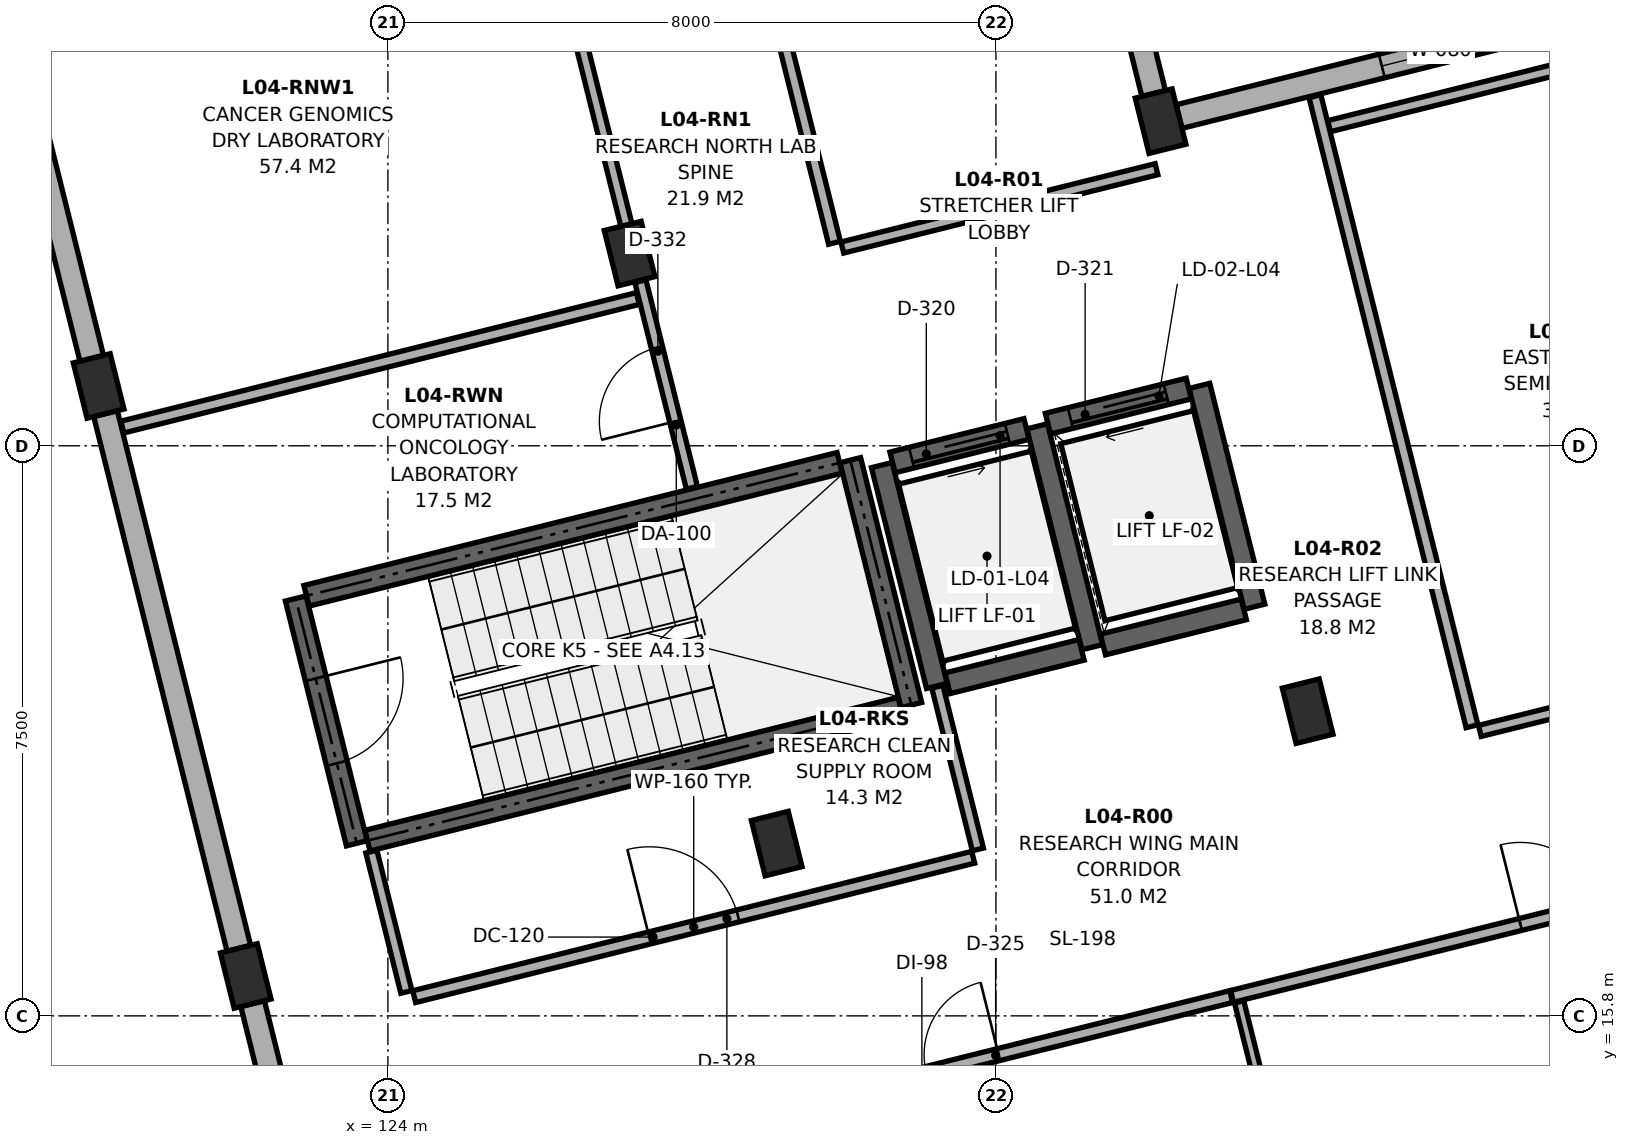
"""IFC4 building model, lengths in metres.
Left out: names, types, materials, properties, quantities, classifications, styles, units other than length and angle.
Written with IfcOpenShell. Run it as: python <this file> out.ifc"""

import sys

from ifc_helpers import new_model, si_unit, direction, frame, frame_2d, origin, origin_2d, place, context, subcontext, project, spatial, rectangle, extrude, element, fill, save


model = new_model("IFC4")
c1 = context("Model", 3, precision=1e-05, world=origin(), true_north=direction((0.0, 1.0)))
c2 = subcontext(c1, "Body", "Model", "MODEL_VIEW")
j1 = project(units=[si_unit("LENGTHUNIT", "METRE"), si_unit("PLANEANGLEUNIT", "RADIAN")], contexts=[c1])
p1 = place(None, origin())
s1 = spatial("IfcSite", under=j1, at=p1, CompositionType="ELEMENT")
p2 = place(p1, origin())
s2 = spatial("IfcBuilding", under=s1, at=p2, CompositionType="ELEMENT")
p3 = place(p2, frame((0.0, 0.0, 17.5)))
s3 = spatial("IfcBuildingStorey", under=s2, at=p3, CompositionType="ELEMENT", Elevation=17.5)
for number, where, z_axis, x_axis in (
    (1, (122.129, 16.325, 0.0), (0.0, 0.0, 1.0), (0.97, 0.242, 0.0)),
    (2, (120.194, 24.087, 0.0), (0.0, 0.0, 1.0), (0.97, 0.242, 0.0)),
    (3, (129.115, 18.067, 0.0), (0.0, 0.0, 1.0), (0.97, 0.242, 0.0)),
    (4, (127.18, 25.829, 0.0), (0.0, 0.0, 1.0), (0.97, 0.242, 0.0)),
    (5, (136.102, 19.808, 0.0), (0.0, 0.0, 1.0), (0.97, 0.242, 0.0)),
    (6, (134.166, 27.571, 0.0), (0.0, 0.0, 1.0), (0.97, 0.242, 0.0)),
):
    element("IfcColumn", number, at=place(p3, frame(where, z_axis=z_axis, x_axis=x_axis)), inside=s3, PredefinedType="COLUMN", context=c2, shape_type="SweptSolid", body=[
        extrude(rectangle(XDim=0.5, YDim=0.75, at=origin_2d()), origin(), (0.0, 0.0, 1.0), 3.72),
    ])
p4 = place(p3, frame((132.291, 35.091, 0.0), z_axis=(0.0, 0.0, 1.0), x_axis=(0.241920240952, -0.970296138825, 0.0)))
e7 = element("IfcWall", 7, at=p4, inside=s3, PredefinedType="SOLIDWALL", context=c2, shape_type="SweptSolid", body=[
    extrude(rectangle(XDim=7.375, YDim=0.32, at=frame_2d((3.688, 0.0))), origin(), (0.0, 0.0, 1.0), 3.055),
])
p5 = place(p4, frame((2.788, 0.0, 0.9)))
e8 = element("IfcOpeningElement", 8, at=p5, cuts=e7, PredefinedType="OPENING", context=c2, shape_type="SweptSolid", body=[
    extrude(rectangle(XDim=1.8, YDim=1.3, at=frame_2d((0.9, 0.65))), frame((0.0, 0.172, 0.0), z_axis=(0.0, -1.0, 0.0), x_axis=(1.0, 0.0, 0.0)), (0.0, 0.0, 1.0), 0.344),
])
p6 = place(p3, frame((134.409, 27.631, 0.0), z_axis=(0.0, 0.0, 1.0), x_axis=(0.97030006528, 0.241904492141, 0.0)))
e9 = element("IfcWall", 9, at=p6, inside=s3, PredefinedType="SOLIDWALL", context=c2, shape_type="SweptSolid", body=[
    extrude(rectangle(XDim=7.1, YDim=0.32, at=frame_2d((3.55, 0.0))), origin(), (0.0, 0.0, 1.0), 3.005),
])
p7 = place(p6, frame((2.75, 0.0, 0.9)))
e10 = element("IfcOpeningElement", 10, at=p7, cuts=e9, PredefinedType="OPENING", context=c2, shape_type="SweptSolid", body=[
    extrude(rectangle(XDim=1.6, YDim=1.5, at=frame_2d((0.8, 0.75))), frame((0.0, 0.172, 0.0), z_axis=(0.0, -1.0, 0.0), x_axis=(1.0, 0.0, 0.0)), (0.0, 0.0, 1.0), 0.344),
])
for number, where, z_axis, x_axis in (
    (11, (123.974, 8.926, 0.0), (0.0, 0.0, 1.0), (-0.242, 0.97, 0.0)),
    (12, (122.039, 16.688, 0.0), (0.0, 0.0, 1.0), (-0.242, 0.97, 0.0)),
):
    element("IfcWall", number, at=place(p3, frame(where, z_axis=z_axis, x_axis=x_axis)), inside=s3, PredefinedType="SOLIDWALL", context=c2, shape_type="SweptSolid", body=[
        extrude(rectangle(XDim=7.25, YDim=0.32, at=frame_2d((3.625, 0.0))), origin(), (0.0, 0.0, 1.0), 3.005),
    ])
p8 = place(p3, frame((120.103, 24.451, 0.0), z_axis=(0.0, 0.0, 1.0), x_axis=(-0.241920240952, 0.970296138825, 0.0)))
e13 = element("IfcWall", 13, at=p8, inside=s3, PredefinedType="SOLIDWALL", context=c2, shape_type="SweptSolid", body=[
    extrude(rectangle(XDim=7.375, YDim=0.32, at=frame_2d((3.688, 0.0))), origin(), (0.0, 0.0, 1.0), 3.055),
])
p9 = place(p3, frame((123.731, 18.105, 0.0), z_axis=(0.0, 0.0, 1.0), x_axis=(0.970297238923, 0.241915828623, 0.0)))
e14 = element("IfcWall", 14, at=p9, inside=s3, PredefinedType="SHEAR", context=c2, shape_type="SweptSolid", body=[
    extrude(rectangle(XDim=7.23, YDim=0.28, at=frame_2d((3.615, 0.0))), origin(), (0.0, 0.0, 1.0), 3.72),
])
p10 = place(p3, frame((130.887, 19.889, 0.0), z_axis=(0.0, 0.0, 1.0), x_axis=(-0.241947258837, 0.970289402158, 0.0)))
e15 = element("IfcWall", 15, at=p10, inside=s3, PredefinedType="SHEAR", context=c2, shape_type="SweptSolid", body=[
    extrude(rectangle(XDim=3.32, YDim=0.28, at=frame_2d((1.66, 0.0))), origin(), (0.0, 0.0, 1.0), 3.72),
])
p11 = place(p3, frame((129.943, 23.076, 0.0), z_axis=(0.0, 0.0, 1.0), x_axis=(-0.970289312034, -0.241947620266, 0.0)))
e16 = element("IfcWall", 16, at=p11, inside=s3, PredefinedType="SHEAR", context=c2, shape_type="SweptSolid", body=[
    extrude(rectangle(XDim=7.23, YDim=0.28, at=frame_2d((3.615, 0.0))), origin(), (0.0, 0.0, 1.0), 3.72),
])
p12 = place(p3, frame((122.787, 21.292, 0.0), z_axis=(0.0, 0.0, 1.0), x_axis=(0.241860763027, -0.970310966293, 0.0)))
e17 = element("IfcWall", 17, at=p12, inside=s3, PredefinedType="SHEAR", context=c2, shape_type="SweptSolid", body=[
    extrude(rectangle(XDim=3.32, YDim=0.28, at=frame_2d((1.66, 0.0))), origin(), (0.0, 0.0, 1.0), 3.72),
])
p13 = place(p12, frame((1.085, 0.0, 0.0)))
e18 = element("IfcOpeningElement", 18, at=p13, cuts=e17, PredefinedType="OPENING", context=c2, shape_type="SweptSolid", body=[
    extrude(rectangle(XDim=1.15, YDim=2.15, at=frame_2d((0.575, 1.075))), frame((0.0, 0.152, 0.0), z_axis=(0.0, -1.0, 0.0), x_axis=(1.0, 0.0, 0.0)), (0.0, 0.0, 1.0), 0.304),
])
p14 = place(p3, frame((131.363, 20.176, 0.0), z_axis=(0.0, 0.0, 1.0), x_axis=(0.970284587517, 0.241966566341, 0.0)))
e19 = element("IfcWall", 19, at=p14, inside=s3, PredefinedType="SHEAR", context=c2, shape_type="SweptSolid", body=[
    extrude(rectangle(XDim=1.817, YDim=0.28, at=frame_2d((0.909, 0.0))), origin(), (0.0, 0.0, 1.0), 3.72),
])
p15 = place(p3, frame((133.267, 20.651, 0.0), z_axis=(0.0, 0.0, 1.0), x_axis=(-0.241921647353, 0.970295788171, 0.0)))
e20 = element("IfcWall", 20, at=p15, inside=s3, PredefinedType="SHEAR", context=c2, shape_type="SweptSolid", body=[
    extrude(rectangle(XDim=2.994, YDim=0.28, at=frame_2d((1.497, 0.0))), origin(), (0.0, 0.0, 1.0), 3.72),
])
p16 = place(p3, frame((132.402, 23.521, 0.0), z_axis=(0.0, 0.0, 1.0), x_axis=(-0.970284587517, -0.241966566341, 0.0)))
e21 = element("IfcWall", 21, at=p16, inside=s3, PredefinedType="SHEAR", context=c2, shape_type="SweptSolid", body=[
    extrude(rectangle(XDim=1.817, YDim=0.28, at=frame_2d((0.909, 0.0))), origin(), (0.0, 0.0, 1.0), 3.72),
])
p17 = place(p16, frame((0.259, 0.0, 0.0)))
e22 = element("IfcOpeningElement", 22, at=p17, cuts=e21, PredefinedType="OPENING", context=c2, shape_type="SweptSolid", body=[
    extrude(rectangle(XDim=1.3, YDim=2.2, at=frame_2d((0.65, 1.1))), frame((0.0, 0.152, 0.0), z_axis=(0.0, -1.0, 0.0), x_axis=(1.0, 0.0, 0.0)), (0.0, 0.0, 1.0), 0.304),
])
p18 = place(p3, frame((130.498, 23.046, 0.0), z_axis=(0.0, 0.0, 1.0), x_axis=(0.241921647353, -0.970295788171, 0.0)))
e23 = element("IfcWall", 23, at=p18, inside=s3, PredefinedType="SHEAR", context=c2, shape_type="SweptSolid", body=[
    extrude(rectangle(XDim=2.994, YDim=0.28, at=frame_2d((1.497, 0.0))), origin(), (0.0, 0.0, 1.0), 3.72),
])
p19 = place(p3, frame((133.408, 20.686, 0.0), z_axis=(0.0, 0.0, 1.0), x_axis=(0.970285190026, 0.241964150272, 0.0)))
e24 = element("IfcWall", 24, at=p19, inside=s3, PredefinedType="SHEAR", context=c2, shape_type="SweptSolid", body=[
    extrude(rectangle(XDim=1.91, YDim=0.28, at=frame_2d((0.955, 0.0))), origin(), (0.0, 0.0, 1.0), 3.72),
])
p20 = place(p3, frame((135.402, 21.183, 0.0), z_axis=(0.0, 0.0, 1.0), x_axis=(-0.241921647353, 0.970295788171, 0.0)))
e25 = element("IfcWall", 25, at=p20, inside=s3, PredefinedType="SHEAR", context=c2, shape_type="SweptSolid", body=[
    extrude(rectangle(XDim=2.994, YDim=0.28, at=frame_2d((1.497, 0.0))), origin(), (0.0, 0.0, 1.0), 3.72),
])
p21 = place(p3, frame((134.537, 24.053, 0.0), z_axis=(0.0, 0.0, 1.0), x_axis=(-0.970285190026, -0.241964150272, 0.0)))
e26 = element("IfcWall", 26, at=p21, inside=s3, PredefinedType="SHEAR", context=c2, shape_type="SweptSolid", body=[
    extrude(rectangle(XDim=1.91, YDim=0.28, at=frame_2d((0.955, 0.0))), origin(), (0.0, 0.0, 1.0), 3.72),
])
p22 = place(p21, frame((0.305, 0.0, 0.0)))
e27 = element("IfcOpeningElement", 27, at=p22, cuts=e26, PredefinedType="OPENING", context=c2, shape_type="SweptSolid", body=[
    extrude(rectangle(XDim=1.3, YDim=2.2, at=frame_2d((0.65, 1.1))), frame((0.0, 0.152, 0.0), z_axis=(0.0, -1.0, 0.0), x_axis=(1.0, 0.0, 0.0)), (0.0, 0.0, 1.0), 0.304),
])
p23 = place(p3, frame((124.346, 16.053, 0.0), z_axis=(0.0, 0.0, 1.0), x_axis=(0.970295772287, 0.241921711059, 0.0)))
e28 = element("IfcWall", 28, at=p23, inside=s3, PredefinedType="PARTITIONING", context=c2, shape_type="SweptSolid", body=[
    extrude(rectangle(XDim=7.58, YDim=0.16, at=frame_2d((3.79, 0.0))), origin(), (0.0, 0.0, 1.0), 2.905),
])
p24 = place(p23, frame((3.19, 0.0, 0.0)))
e29 = element("IfcOpeningElement", 29, at=p24, cuts=e28, PredefinedType="OPENING", context=c2, shape_type="SweptSolid", body=[
    extrude(rectangle(XDim=1.2, YDim=2.15, at=frame_2d((0.6, 1.075))), frame((0.0, 0.092, 0.0), z_axis=(0.0, -1.0, 0.0), x_axis=(1.0, 0.0, 0.0)), (0.0, 0.0, 1.0), 0.184),
])
p25 = place(p3, frame((128.0, 22.748, 0.0), z_axis=(0.0, 0.0, 1.0), x_axis=(-0.241961339667, 0.970285890914, 0.0)))
e30 = element("IfcWall", 30, at=p25, inside=s3, PredefinedType="PARTITIONING", context=c2, shape_type="SweptSolid", body=[
    extrude(rectangle(XDim=2.801, YDim=0.15, at=frame_2d((1.4, 0.0))), origin(), (0.0, 0.0, 1.0), 3.055),
])
p26 = place(p25, frame((0.9, 0.0, 0.0)))
e31 = element("IfcOpeningElement", 31, at=p26, cuts=e30, PredefinedType="OPENING", context=c2, shape_type="SweptSolid", body=[
    extrude(rectangle(XDim=1.0, YDim=2.22, at=frame_2d((0.5, 1.11))), frame((0.0, 0.087, 0.0), z_axis=(0.0, -1.0, 0.0), x_axis=(1.0, 0.0, 0.0)), (0.0, 0.0, 1.0), 0.174),
])
p27 = place(p3, frame((128.023, 14.29, 0.0), z_axis=(0.0, 0.0, 1.0), x_axis=(0.970294040363, 0.241928657328, 0.0)))
e32 = element("IfcWall", 32, at=p27, inside=s3, PredefinedType="PARTITIONING", context=c2, shape_type="SweptSolid", body=[
    extrude(rectangle(XDim=7.288, YDim=0.16, at=frame_2d((3.644, 0.0))), origin(), (0.0, 0.0, 1.0), 2.905),
])
p28 = place(p27, frame((3.154, 0.0, 0.0)))
e33 = element("IfcOpeningElement", 33, at=p28, cuts=e32, PredefinedType="OPENING", context=c2, shape_type="SweptSolid", body=[
    extrude(rectangle(XDim=0.98, YDim=2.12, at=frame_2d((0.49, 1.06))), frame((0.0, 0.092, 0.0), z_axis=(0.0, -1.0, 0.0), x_axis=(1.0, 0.0, 0.0)), (0.0, 0.0, 1.0), 0.184),
])
p29 = place(p3, frame((135.107, 16.056, 0.0), z_axis=(0.0, 0.0, 1.0), x_axis=(0.970295585276, 0.24192246112, 0.0)))
e34 = element("IfcWall", 34, at=p29, inside=s3, PredefinedType="PARTITIONING", context=c2, shape_type="SweptSolid", body=[
    extrude(rectangle(XDim=8.901, YDim=0.16, at=frame_2d((4.45, 0.0))), origin(), (0.0, 0.0, 1.0), 2.905),
])
p30 = place(p29, frame((3.91, 0.0, 0.0)))
e35 = element("IfcOpeningElement", 35, at=p30, cuts=e34, PredefinedType="OPENING", context=c2, shape_type="SweptSolid", body=[
    extrude(rectangle(XDim=1.08, YDim=2.18, at=frame_2d((0.54, 1.09))), frame((0.0, 0.092, 0.0), z_axis=(0.0, -1.0, 0.0), x_axis=(1.0, 0.0, 0.0)), (0.0, 0.0, 1.0), 0.184),
])
p31 = place(p3, frame((138.367, 19.549, 0.0), z_axis=(0.0, 0.0, 1.0), x_axis=(0.970289077222, 0.241948561938, 0.0)))
e36 = element("IfcWall", 36, at=p31, inside=s3, PredefinedType="PARTITIONING", context=c2, shape_type="SweptSolid", body=[
    extrude(rectangle(XDim=4.893, YDim=0.15, at=frame_2d((2.446, 0.0))), origin(), (0.0, 0.0, 1.0), 3.005),
])
p32 = place(p31, frame((1.886, 0.0, 0.0)))
e37 = element("IfcOpeningElement", 37, at=p32, cuts=e36, PredefinedType="OPENING", context=c2, shape_type="SweptSolid", body=[
    extrude(rectangle(XDim=1.12, YDim=2.2, at=frame_2d((0.56, 1.1))), frame((0.0, 0.087, 0.0), z_axis=(0.0, -1.0, 0.0), x_axis=(1.0, 0.0, 0.0)), (0.0, 0.0, 1.0), 0.174),
])
p33 = place(p3, frame((127.203, 25.943, 0.0), z_axis=(0.0, 0.0, 1.0), x_axis=(-0.241933510305, 0.970292830331, 0.0)))
e38 = element("IfcWall", 38, at=p33, inside=s3, PredefinedType="PARTITIONING", context=c2, shape_type="SweptSolid", body=[
    extrude(rectangle(XDim=7.633, YDim=0.15, at=frame_2d((3.816, 0.0))), origin(), (0.0, 0.0, 1.0), 3.055),
])
p34 = place(p33, frame((3.197, 0.0, 0.0)))
e39 = element("IfcOpeningElement", 39, at=p34, cuts=e38, PredefinedType="OPENING", context=c2, shape_type="SweptSolid", body=[
    extrude(rectangle(XDim=1.24, YDim=2.2, at=frame_2d((0.62, 1.1))), frame((0.0, 0.087, 0.0), z_axis=(0.0, -1.0, 0.0), x_axis=(1.0, 0.0, 0.0)), (0.0, 0.0, 1.0), 0.174),
])
p35 = place(p3, frame((129.876, 25.97, 0.0), z_axis=(0.0, 0.0, 1.0), x_axis=(-0.241943441893, 0.970290353928, 0.0)))
e40 = element("IfcWall", 40, at=p35, inside=s3, PredefinedType="PARTITIONING", context=c2, shape_type="SweptSolid", body=[
    extrude(rectangle(XDim=8.343, YDim=0.16, at=frame_2d((4.171, 0.0))), origin(), (0.0, 0.0, 1.0), 3.055),
])
p36 = place(p35, frame((3.531, 0.0, 0.0)))
e41 = element("IfcOpeningElement", 41, at=p36, cuts=e40, PredefinedType="OPENING", context=c2, shape_type="SweptSolid", body=[
    extrude(rectangle(XDim=1.28, YDim=2.22, at=frame_2d((0.64, 1.11))), frame((0.0, 0.092, 0.0), z_axis=(0.0, -1.0, 0.0), x_axis=(1.0, 0.0, 0.0)), (0.0, 0.0, 1.0), 0.184),
])
p37 = place(p3, frame((124.243, 16.115, 0.0), z_axis=(0.0, 0.0, 1.0), x_axis=(-0.241962034071, 0.970285717749, 0.0)))
e42 = element("IfcWall", 42, at=p37, inside=s3, PredefinedType="PARTITIONING", context=c2, shape_type="SweptSolid", body=[
    extrude(rectangle(XDim=1.903, YDim=0.15, at=frame_2d((0.952, 0.0))), origin(), (0.0, 0.0, 1.0), 3.005),
])
p38 = place(p3, frame((131.763, 17.99, 0.0), z_axis=(0.0, 0.0, 1.0), x_axis=(-0.241962612769, 0.970285573438, 0.0)))
e43 = element("IfcWall", 43, at=p38, inside=s3, PredefinedType="PARTITIONING", context=c2, shape_type="SweptSolid", body=[
    extrude(rectangle(XDim=2.206, YDim=0.15, at=frame_2d((1.103, 0.0))), origin(), (0.0, 0.0, 1.0), 3.005),
])
p39 = place(p3, frame((120.506, 23.547, 0.0), z_axis=(0.0, 0.0, 1.0), x_axis=(0.970300468758, 0.241902873748, 0.0)))
e44 = element("IfcWall", 44, at=p39, inside=s3, PredefinedType="PARTITIONING", context=c2, shape_type="SweptSolid", body=[
    extrude(rectangle(XDim=6.991, YDim=0.16, at=frame_2d((3.496, 0.0))), origin(), (0.0, 0.0, 1.0), 3.005),
])
p40 = place(p3, frame((136.898, 9.172, 0.0), z_axis=(0.0, 0.0, 1.0), x_axis=(-0.241913757308, 0.970297755344, 0.0)))
e45 = element("IfcWall", 45, at=p40, inside=s3, PredefinedType="PARTITIONING", context=c2, shape_type="SweptSolid", body=[
    extrude(rectangle(XDim=7.021, YDim=0.125, at=frame_2d((3.51, 0.0))), origin(), (0.0, 0.0, 1.0), 3.005),
])
p41 = place(p3, frame((136.383, 27.505, 0.0), z_axis=(0.0, 0.0, 1.0), x_axis=(0.970303709543, 0.241889874215, 0.0)))
e46 = element("IfcWall", 46, at=p41, inside=s3, PredefinedType="PARTITIONING", context=c2, shape_type="SweptSolid", body=[
    extrude(rectangle(XDim=4.893, YDim=0.15, at=frame_2d((2.447, 0.0))), origin(), (0.0, 0.0, 1.0), 3.7),
])
p42 = place(p3, frame((138.264, 19.611, 0.0), z_axis=(0.0, 0.0, 1.0), x_axis=(-0.241937132378, 0.970291927193, 0.0)))
e47 = element("IfcWall", 47, at=p42, inside=s3, PredefinedType="PARTITIONING", context=c2, shape_type="SweptSolid", body=[
    extrude(rectangle(XDim=8.543, YDim=0.16, at=frame_2d((4.271, 0.0))), origin(), (0.0, 0.0, 1.0), 3.055),
])
p43 = place(p3, frame((129.979, 25.908, 0.0), z_axis=(0.0, 0.0, 1.0), x_axis=(0.970297382189, 0.241915254, 0.0)))
e48 = element("IfcWall", 48, at=p43, inside=s3, PredefinedType="PARTITIONING", context=c2, shape_type="SweptSolid", body=[
    extrude(rectangle(XDim=4.26, YDim=0.15, at=frame_2d((2.13, 0.0))), origin(), (0.0, 0.0, 1.0), 3.005),
])
p44 = place(p7, origin())
e49 = element("IfcWindow", 49, at=p44, inside=s3, PartitioningType="DOUBLE_PANEL_VERTICAL", PredefinedType="WINDOW", context=c2, shape_type="SweptSolid", body=[
    extrude(rectangle(XDim=1.6, YDim=1.5, at=frame_2d((0.8, 0.75))), frame((0.0, 0.03, 0.0), z_axis=(0.0, -1.0, 0.0), x_axis=(1.0, 0.0, 0.0)), (0.0, 0.0, 1.0), 0.06),
])
fill(e10, e49)
p45 = place(p13, origin())
e50 = element("IfcDoor", 50, at=p45, inside=s3, OperationType="SINGLE_SWING_LEFT", PredefinedType="DOOR", context=c2, shape_type="SweptSolid", body=[
    extrude(rectangle(XDim=1.15, YDim=2.15, at=frame_2d((0.575, 1.075))), frame((0.0, 0.025, 0.0), z_axis=(0.0, -1.0, 0.0), x_axis=(1.0, 0.0, 0.0)), (0.0, 0.0, 1.0), 0.05),
])
fill(e18, e50)
p46 = place(p17, origin())
e51 = element("IfcDoor", 51, at=p46, inside=s3, OperationType="SLIDING_TO_LEFT", PredefinedType="DOOR", context=c2, shape_type="SweptSolid", body=[
    extrude(rectangle(XDim=1.3, YDim=2.2, at=frame_2d((0.65, 1.1))), frame((0.0, 0.025, 0.0), z_axis=(0.0, -1.0, 0.0), x_axis=(1.0, 0.0, 0.0)), (0.0, 0.0, 1.0), 0.05),
])
fill(e22, e51)
p47 = place(p22, origin())
e52 = element("IfcDoor", 52, at=p47, inside=s3, OperationType="SLIDING_TO_RIGHT", PredefinedType="DOOR", context=c2, shape_type="SweptSolid", body=[
    extrude(rectangle(XDim=1.3, YDim=2.2, at=frame_2d((0.65, 1.1))), frame((0.0, 0.025, 0.0), z_axis=(0.0, -1.0, 0.0), x_axis=(1.0, 0.0, 0.0)), (0.0, 0.0, 1.0), 0.05),
])
fill(e27, e52)
p48 = place(p24, origin())
e53 = element("IfcDoor", 53, at=p48, inside=s3, OperationType="SINGLE_SWING_LEFT", PredefinedType="DOOR", context=c2, shape_type="SweptSolid", body=[
    extrude(rectangle(XDim=1.2, YDim=2.15, at=frame_2d((0.6, 1.075))), frame((0.0, 0.025, 0.0), z_axis=(0.0, -1.0, 0.0), x_axis=(1.0, 0.0, 0.0)), (0.0, 0.0, 1.0), 0.05),
])
fill(e29, e53)
p49 = place(p26, origin())
e54 = element("IfcDoor", 54, at=p49, inside=s3, OperationType="SINGLE_SWING_LEFT", PredefinedType="DOOR", context=c2, shape_type="SweptSolid", body=[
    extrude(rectangle(XDim=1.0, YDim=2.22, at=frame_2d((0.5, 1.11))), frame((0.0, 0.025, 0.0), z_axis=(0.0, -1.0, 0.0), x_axis=(1.0, 0.0, 0.0)), (0.0, 0.0, 1.0), 0.05),
])
fill(e31, e54)
p50 = place(p28, origin())
e55 = element("IfcDoor", 55, at=p50, inside=s3, OperationType="SINGLE_SWING_RIGHT", PredefinedType="DOOR", context=c2, shape_type="SweptSolid", body=[
    extrude(rectangle(XDim=0.98, YDim=2.12, at=frame_2d((0.49, 1.06))), frame((0.0, 0.025, 0.0), z_axis=(0.0, -1.0, 0.0), x_axis=(1.0, 0.0, 0.0)), (0.0, 0.0, 1.0), 0.05),
])
fill(e33, e55)
p51 = place(p30, origin())
e56 = element("IfcDoor", 56, at=p51, inside=s3, OperationType="SINGLE_SWING_LEFT", PredefinedType="DOOR", context=c2, shape_type="SweptSolid", body=[
    extrude(rectangle(XDim=1.08, YDim=2.18, at=frame_2d((0.54, 1.09))), frame((0.0, 0.025, 0.0), z_axis=(0.0, -1.0, 0.0), x_axis=(1.0, 0.0, 0.0)), (0.0, 0.0, 1.0), 0.05),
])
fill(e35, e56)
save(model, sys.argv[1])
